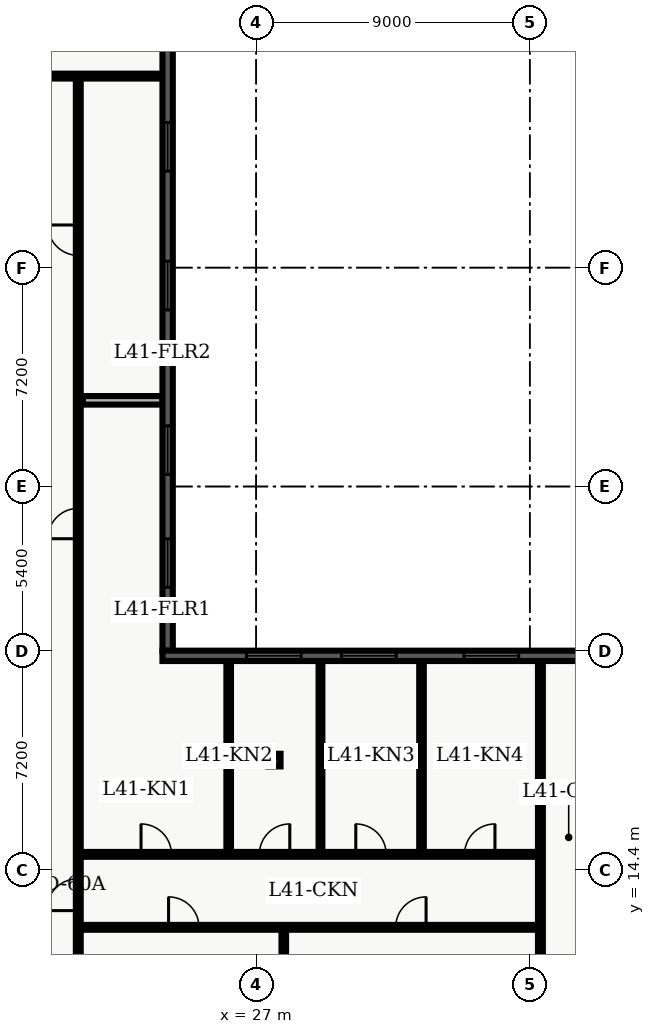
"""IFC4 building model, lengths in metres.
Left out: names, types, materials, properties, quantities, classifications, styles, units other than length and angle.
Written with IfcOpenShell. Run it as: python <this file> out.ifc"""

import sys

from ifc_helpers import new_model, entity, si_unit, converted_unit, direction, frame, origin_with_axes, origin_2d_with_axis, place, context, subcontext, project, spatial, polyline, rectangle, i_section, outline, extrude, element, fill, save


model = new_model("IFC4")
c1 = context("Model", 3, precision=1e-05, world=origin_with_axes(), true_north=direction((0.0, 1.0)))
c2 = subcontext(c1, "Body", "Model", "MODEL_VIEW")
j1 = project(units=[si_unit("LENGTHUNIT", "METRE"), converted_unit("PLANEANGLEUNIT", "DEGREE", entity("IfcPlaneAngleMeasure", 0.017), si_unit("PLANEANGLEUNIT", "RADIAN"), dimensions=[0, 0, 0, 0, 0, 0, 0])], contexts=[c1])
p1 = place(None, origin_with_axes())
s1 = spatial("IfcSite", under=j1, at=p1, CompositionType="ELEMENT")
p2 = place(p1, origin_with_axes())
s2 = spatial("IfcBuilding", under=s1, at=p2, CompositionType="ELEMENT")
p3 = place(p2, frame((0.0, 0.0, 168.0), z_axis=(0.0, 0.0, 1.0), x_axis=(1.0, 0.0, 0.0)))
s3 = spatial("IfcBuildingStorey", under=s2, at=p3, CompositionType="ELEMENT", Elevation=168.0)
p4 = place(p3, frame((27.6, 18.0, 0.0), z_axis=(0.0, 0.0, 1.0), x_axis=(1.0, 0.0, 0.0)))
e1 = element("IfcColumn", 1, at=p4, inside=s3, PredefinedType="COLUMN", context=c2, shape_type="SweptSolid", body=[
    extrude(i_section(OverallWidth=0.406, OverallDepth=0.416, WebThickness=0.03, FlangeThickness=0.048, FilletRadius=0.022, at=origin_2d_with_axis()), origin_with_axes(), (0.0, 0.0, 1.0), 3.9),
])
p5 = place(p3, frame((2.6, 40.5, 0.0), z_axis=(0.0, 0.0, 1.0), x_axis=(1.0, 0.0, 0.0)))
e2 = element("IfcWall", 2, at=p5, inside=s3, PredefinedType="PARTITIONING", context=c2, shape_type="SweptSolid", body=[
    extrude(outline(polyline([(0.0, -0.08), (21.324, -0.08), (21.324, 0.08), (0.0, 0.08), (0.0, -0.08)])), origin_with_axes(), (0.0, 0.0, 1.0), 2.7),
])
p6 = place(p5, frame((4.395, 0.0, 0.0), z_axis=(0.0, 0.0, 1.0), x_axis=(1.0, 0.0, 0.0)))
e3 = element("IfcOpeningElement", 3, at=p6, cuts=e2, PredefinedType="OPENING", context=c2, shape_type="SweptSolid", body=[
    extrude(rectangle(XDim=1.2, YDim=0.18, at=origin_2d_with_axis()), origin_with_axes(), (0.0, 0.0, 1.0), 2.2),
])
p7 = place(p5, frame((13.16, 0.0, 0.0), z_axis=(0.0, 0.0, 1.0), x_axis=(1.0, 0.0, 0.0)))
e4 = element("IfcOpeningElement", 4, at=p7, cuts=e2, PredefinedType="OPENING", context=c2, shape_type="SweptSolid", body=[
    extrude(rectangle(XDim=1.0, YDim=0.18, at=origin_2d_with_axis()), origin_with_axes(), (0.0, 0.0, 1.0), 2.15),
])
p8 = place(p3, frame((21.15, 7.8, 0.0), z_axis=(0.0, 0.0, 1.0), x_axis=(0.0, 1.0, 0.0)))
e5 = element("IfcWall", 5, at=p8, inside=s3, PredefinedType="PARTITIONING", context=c2, shape_type="SweptSolid", body=[
    extrude(outline(polyline([(0.0, -0.08), (32.7, -0.08), (32.7, 0.08), (0.0, 0.08), (0.0, -0.08)])), origin_with_axes(), (0.0, 0.0, 1.0), 2.7),
])
p9 = place(p8, frame((17.983, 0.0, 0.0), z_axis=(0.0, 0.0, 1.0), x_axis=(1.0, 0.0, 0.0)))
e6 = element("IfcOpeningElement", 6, at=p9, cuts=e5, PredefinedType="OPENING", context=c2, shape_type="SweptSolid", body=[
    extrude(rectangle(XDim=1.0, YDim=0.18, at=origin_2d_with_axis()), origin_with_axes(), (0.0, 0.0, 1.0), 2.15),
])
p10 = place(p8, frame((27.302, 0.0, 0.0), z_axis=(0.0, 0.0, 1.0), x_axis=(1.0, 0.0, 0.0)))
e7 = element("IfcOpeningElement", 7, at=p10, cuts=e5, PredefinedType="OPENING", context=c2, shape_type="SweptSolid", body=[
    extrude(rectangle(XDim=1.0, YDim=0.18, at=origin_2d_with_axis()), origin_with_axes(), (0.0, 0.0, 1.0), 2.15),
])
p11 = place(p8, frame((5.775, 0.0, 0.0), z_axis=(0.0, 0.0, 1.0), x_axis=(1.0, 0.0, 0.0)))
e8 = element("IfcOpeningElement", 8, at=p11, cuts=e5, PredefinedType="OPENING", context=c2, shape_type="SweptSolid", body=[
    extrude(rectangle(XDim=1.05, YDim=0.18, at=origin_2d_with_axis()), origin_with_axes(), (0.0, 0.0, 1.0), 2.15),
])
p12 = place(p3, frame((21.3, 29.835, 0.0), z_axis=(0.0, 0.0, 1.0), x_axis=(1.0, 0.0, 0.0)))
e9 = element("IfcWall", 9, at=p12, inside=s3, PredefinedType="PARTITIONING", context=c2, shape_type="SweptSolid", body=[
    extrude(outline(polyline([(0.0, -0.14), (2.624, -0.14), (2.624, 0.14), (0.0, 0.14), (0.0, -0.14)])), origin_with_axes(), (0.0, 0.0, 1.0), 2.7),
])
p13 = place(p3, frame((21.15, 12.5, 0.0), z_axis=(0.0, 0.0, 1.0), x_axis=(1.0, 0.0, 0.0)))
e10 = element("IfcWall", 10, at=p13, inside=s3, PredefinedType="PARTITIONING", context=c2, shape_type="SweptSolid", body=[
    extrude(outline(polyline([(0.0, -0.08), (15.2, -0.08), (15.2, 0.08), (0.0, 0.08), (0.0, -0.08)])), origin_with_axes(), (0.0, 0.0, 1.0), 2.7),
])
p14 = place(p13, frame((3.47, 0.0, 0.0), z_axis=(0.0, 0.0, 1.0), x_axis=(1.0, 0.0, 0.0)))
e11 = element("IfcOpeningElement", 11, at=p14, cuts=e10, PredefinedType="OPENING", context=c2, shape_type="SweptSolid", body=[
    extrude(rectangle(XDim=1.0, YDim=0.18, at=origin_2d_with_axis()), origin_with_axes(), (0.0, 0.0, 1.0), 2.15),
])
p15 = place(p13, frame((10.94, 0.0, 0.0), z_axis=(0.0, 0.0, 1.0), x_axis=(1.0, 0.0, 0.0)))
e12 = element("IfcOpeningElement", 12, at=p15, cuts=e10, PredefinedType="OPENING", context=c2, shape_type="SweptSolid", body=[
    extrude(rectangle(XDim=1.0, YDim=0.18, at=origin_2d_with_axis()), origin_with_axes(), (0.0, 0.0, 1.0), 2.15),
])
p16 = place(p3, frame((21.15, 14.9, 0.0), z_axis=(0.0, 0.0, 1.0), x_axis=(1.0, 0.0, 0.0)))
e13 = element("IfcWall", 13, at=p16, inside=s3, PredefinedType="PARTITIONING", context=c2, shape_type="SweptSolid", body=[
    extrude(outline(polyline([(0.0, -0.08), (15.2, -0.08), (15.2, 0.08), (0.0, 0.08), (0.0, -0.08)])), origin_with_axes(), (0.0, 0.0, 1.0), 2.7),
])
p17 = place(p16, frame((2.563, 0.0, 0.0), z_axis=(0.0, 0.0, 1.0), x_axis=(1.0, 0.0, 0.0)))
e14 = element("IfcOpeningElement", 14, at=p17, cuts=e13, PredefinedType="OPENING", context=c2, shape_type="SweptSolid", body=[
    extrude(rectangle(XDim=1.0, YDim=0.18, at=origin_2d_with_axis()), origin_with_axes(), (0.0, 0.0, 1.0), 2.15),
])
p18 = place(p16, frame((6.457, 0.0, 0.0), z_axis=(0.0, 0.0, 1.0), x_axis=(1.0, 0.0, 0.0)))
e15 = element("IfcOpeningElement", 15, at=p18, cuts=e13, PredefinedType="OPENING", context=c2, shape_type="SweptSolid", body=[
    extrude(rectangle(XDim=1.0, YDim=0.18, at=origin_2d_with_axis()), origin_with_axes(), (0.0, 0.0, 1.0), 2.15),
])
p19 = place(p16, frame((9.627, 0.0, 0.0), z_axis=(0.0, 0.0, 1.0), x_axis=(1.0, 0.0, 0.0)))
e16 = element("IfcOpeningElement", 16, at=p19, cuts=e13, PredefinedType="OPENING", context=c2, shape_type="SweptSolid", body=[
    extrude(rectangle(XDim=1.0, YDim=0.18, at=origin_2d_with_axis()), origin_with_axes(), (0.0, 0.0, 1.0), 2.15),
])
p20 = place(p16, frame((13.204, 0.0, 0.0), z_axis=(0.0, 0.0, 1.0), x_axis=(1.0, 0.0, 0.0)))
e17 = element("IfcOpeningElement", 17, at=p20, cuts=e13, PredefinedType="OPENING", context=c2, shape_type="SweptSolid", body=[
    extrude(rectangle(XDim=1.0, YDim=0.18, at=origin_2d_with_axis()), origin_with_axes(), (0.0, 0.0, 1.0), 2.15),
])
p21 = place(p3, frame((36.35, 4.35, 0.0), z_axis=(0.0, 0.0, 1.0), x_axis=(0.0, 1.0, 0.0)))
e18 = element("IfcWall", 18, at=p21, inside=s3, PredefinedType="PARTITIONING", context=c2, shape_type="SweptSolid", body=[
    extrude(outline(polyline([(0.0, -0.08), (16.95, -0.08), (16.95, 0.08), (0.0, 0.08), (0.0, -0.08)])), origin_with_axes(), (0.0, 0.0, 1.0), 2.7),
])
p22 = place(p3, frame((27.909, 0.335, 0.0), z_axis=(0.0, 0.0, 1.0), x_axis=(0.0, 1.0, 0.0)))
e19 = element("IfcWall", 19, at=p22, inside=s3, PredefinedType="PARTITIONING", context=c2, shape_type="SweptSolid", body=[
    extrude(outline(polyline([(0.0, -0.075), (12.045, -0.075), (12.045, 0.075), (0.0, 0.075), (0.0, -0.075)])), origin_with_axes(), (0.0, 0.0, 1.0), 2.7),
])
p23 = place(p3, frame((26.097, 15.02, 0.0), z_axis=(0.0, 0.0, 1.0), x_axis=(0.0, 1.0, 0.0)))
e20 = element("IfcWall", 20, at=p23, inside=s3, PredefinedType="PARTITIONING", context=c2, shape_type="SweptSolid", body=[
    extrude(outline(polyline([(0.0, -0.075), (6.245, -0.075), (6.245, 0.075), (0.0, 0.075), (0.0, -0.075)])), origin_with_axes(), (0.0, 0.0, 1.0), 2.7),
])
p24 = place(p3, frame((29.116, 15.02, 0.0), z_axis=(0.0, 0.0, 1.0), x_axis=(0.0, 1.0, 0.0)))
e21 = element("IfcWall", 21, at=p24, inside=s3, PredefinedType="PARTITIONING", context=c2, shape_type="SweptSolid", body=[
    extrude(outline(polyline([(0.0, -0.062), (6.245, -0.062), (6.245, 0.062), (0.0, 0.062), (0.0, -0.062)])), origin_with_axes(), (0.0, 0.0, 1.0), 2.7),
])
p25 = place(p3, frame((32.439, 15.02, 0.0), z_axis=(0.0, 0.0, 1.0), x_axis=(0.0, 1.0, 0.0)))
e22 = element("IfcWall", 22, at=p25, inside=s3, PredefinedType="PARTITIONING", context=c2, shape_type="SweptSolid", body=[
    extrude(outline(polyline([(0.0, -0.075), (6.245, -0.075), (6.245, 0.075), (0.0, 0.075), (0.0, -0.075)])), origin_with_axes(), (0.0, 0.0, 1.0), 2.7),
])
p26 = place(p3, frame((24.089, 45.62, 0.0), z_axis=(0.0, 0.0, 1.0), x_axis=(0.0, -1.0, 0.0)))
e23 = element("IfcWall", 23, at=p26, inside=s3, PredefinedType="SOLIDWALL", context=c2, shape_type="SweptSolid", body=[
    extrude(outline(polyline([(0.0, -0.17), (24.02, -0.17), (24.02, 0.17), (0.0, 0.17), (0.0, -0.17)])), origin_with_axes(), (0.0, 0.0, 1.0), 3.66),
])
p27 = place(p26, frame((2.882, 0.0, 0.45), z_axis=(0.0, 0.0, 1.0), x_axis=(1.0, 0.0, 0.0)))
e24 = element("IfcOpeningElement", 24, at=p27, cuts=e23, PredefinedType="OPENING", context=c2, shape_type="SweptSolid", body=[
    extrude(rectangle(XDim=1.6, YDim=0.36, at=origin_2d_with_axis()), origin_with_axes(), (0.0, 0.0, 1.0), 2.2),
])
p28 = place(p26, frame((7.446, 0.0, 0.45), z_axis=(0.0, 0.0, 1.0), x_axis=(1.0, 0.0, 0.0)))
e25 = element("IfcOpeningElement", 25, at=p28, cuts=e23, PredefinedType="OPENING", context=c2, shape_type="SweptSolid", body=[
    extrude(rectangle(XDim=1.6, YDim=0.36, at=origin_2d_with_axis()), origin_with_axes(), (0.0, 0.0, 1.0), 2.2),
])
p29 = place(p26, frame((12.01, 0.0, 0.45), z_axis=(0.0, 0.0, 1.0), x_axis=(1.0, 0.0, 0.0)))
e26 = element("IfcOpeningElement", 26, at=p29, cuts=e23, PredefinedType="OPENING", context=c2, shape_type="SweptSolid", body=[
    extrude(rectangle(XDim=1.6, YDim=0.36, at=origin_2d_with_axis()), origin_with_axes(), (0.0, 0.0, 1.0), 2.2),
])
p30 = place(p26, frame((17.424, 0.0, 0.45), z_axis=(0.0, 0.0, 1.0), x_axis=(1.0, 0.0, 0.0)))
e27 = element("IfcOpeningElement", 27, at=p30, cuts=e23, PredefinedType="OPENING", context=c2, shape_type="SweptSolid", body=[
    extrude(rectangle(XDim=1.6, YDim=0.36, at=origin_2d_with_axis()), origin_with_axes(), (0.0, 0.0, 1.0), 2.2),
])
p31 = place(p26, frame((21.138, 0.0, 0.45), z_axis=(0.0, 0.0, 1.0), x_axis=(1.0, 0.0, 0.0)))
e28 = element("IfcOpeningElement", 28, at=p31, cuts=e23, PredefinedType="OPENING", context=c2, shape_type="SweptSolid", body=[
    extrude(rectangle(XDim=1.6, YDim=0.36, at=origin_2d_with_axis()), origin_with_axes(), (0.0, 0.0, 1.0), 2.2),
])
p32 = place(p3, frame((23.919, 21.43, 0.0), z_axis=(0.0, 0.0, 1.0), x_axis=(1.0, 0.0, 0.0)))
e29 = element("IfcWall", 29, at=p32, inside=s3, PredefinedType="SOLIDWALL", context=c2, shape_type="SweptSolid", body=[
    extrude(outline(polyline([(0.0, -0.17), (14.481, -0.17), (14.481, 0.17), (0.0, 0.17), (0.0, -0.17)])), origin_with_axes(), (0.0, 0.0, 1.0), 3.66),
])
p33 = place(p32, frame((3.663, 0.0, 0.45), z_axis=(0.0, 0.0, 1.0), x_axis=(1.0, 0.0, 0.0)))
e30 = element("IfcOpeningElement", 30, at=p33, cuts=e29, PredefinedType="OPENING", context=c2, shape_type="SweptSolid", body=[
    extrude(rectangle(XDim=1.8, YDim=0.36, at=origin_2d_with_axis()), origin_with_axes(), (0.0, 0.0, 1.0), 2.1),
])
p34 = place(p32, frame((6.79, 0.0, 0.45), z_axis=(0.0, 0.0, 1.0), x_axis=(1.0, 0.0, 0.0)))
e31 = element("IfcOpeningElement", 31, at=p34, cuts=e29, PredefinedType="OPENING", context=c2, shape_type="SweptSolid", body=[
    extrude(rectangle(XDim=1.8, YDim=0.36, at=origin_2d_with_axis()), origin_with_axes(), (0.0, 0.0, 1.0), 2.1),
])
p35 = place(p32, frame((10.817, 0.0, 0.45), z_axis=(0.0, 0.0, 1.0), x_axis=(1.0, 0.0, 0.0)))
e32 = element("IfcOpeningElement", 32, at=p35, cuts=e29, PredefinedType="OPENING", context=c2, shape_type="SweptSolid", body=[
    extrude(rectangle(XDim=1.8, YDim=0.36, at=origin_2d_with_axis()), origin_with_axes(), (0.0, 0.0, 1.0), 2.1),
])
p36 = place(p8, frame((17.983, 0.0, 0.0), z_axis=(0.0, 0.0, 1.0), x_axis=(1.0, 0.0, 0.0)))
e33 = element("IfcDoor", 33, at=p36, inside=s3, OperationType="SINGLE_SWING_LEFT", PredefinedType="DOOR", context=c2, shape_type="SweptSolid", body=[
    extrude(rectangle(XDim=1.0, YDim=0.09, at=origin_2d_with_axis()), origin_with_axes(), (0.0, 0.0, 1.0), 2.15),
])
fill(e6, e33)
p37 = place(p8, frame((27.302, 0.0, 0.0), z_axis=(0.0, 0.0, 1.0), x_axis=(1.0, 0.0, 0.0)))
e34 = element("IfcDoor", 34, at=p37, inside=s3, OperationType="SINGLE_SWING_RIGHT", PredefinedType="DOOR", context=c2, shape_type="SweptSolid", body=[
    extrude(rectangle(XDim=1.0, YDim=0.09, at=origin_2d_with_axis()), origin_with_axes(), (0.0, 0.0, 1.0), 2.15),
])
fill(e7, e34)
p38 = place(p8, frame((5.775, 0.0, 0.0), z_axis=(0.0, 0.0, 1.0), x_axis=(1.0, 0.0, 0.0)))
e35 = element("IfcDoor", 35, at=p38, inside=s3, OperationType="SINGLE_SWING_LEFT", PredefinedType="DOOR", context=c2, shape_type="SweptSolid", body=[
    extrude(rectangle(XDim=1.05, YDim=0.09, at=origin_2d_with_axis()), origin_with_axes(), (0.0, 0.0, 1.0), 2.15),
])
fill(e8, e35)
p39 = place(p13, frame((3.47, 0.0, 0.0), z_axis=(0.0, 0.0, 1.0), x_axis=(1.0, 0.0, 0.0)))
e36 = element("IfcDoor", 36, at=p39, inside=s3, OperationType="SINGLE_SWING_LEFT", PredefinedType="DOOR", context=c2, shape_type="SweptSolid", body=[
    extrude(rectangle(XDim=1.0, YDim=0.09, at=origin_2d_with_axis()), origin_with_axes(), (0.0, 0.0, 1.0), 2.15),
])
fill(e11, e36)
p40 = place(p13, frame((10.94, 0.0, 0.0), z_axis=(0.0, 0.0, 1.0), x_axis=(1.0, 0.0, 0.0)))
e37 = element("IfcDoor", 37, at=p40, inside=s3, OperationType="SINGLE_SWING_RIGHT", PredefinedType="DOOR", context=c2, shape_type="SweptSolid", body=[
    extrude(rectangle(XDim=1.0, YDim=0.09, at=origin_2d_with_axis()), origin_with_axes(), (0.0, 0.0, 1.0), 2.15),
])
fill(e12, e37)
p41 = place(p16, frame((2.563, 0.0, 0.0), z_axis=(0.0, 0.0, 1.0), x_axis=(1.0, 0.0, 0.0)))
e38 = element("IfcDoor", 38, at=p41, inside=s3, OperationType="SINGLE_SWING_LEFT", PredefinedType="DOOR", context=c2, shape_type="SweptSolid", body=[
    extrude(rectangle(XDim=1.0, YDim=0.09, at=origin_2d_with_axis()), origin_with_axes(), (0.0, 0.0, 1.0), 2.15),
])
fill(e14, e38)
p42 = place(p16, frame((6.457, 0.0, 0.0), z_axis=(0.0, 0.0, 1.0), x_axis=(1.0, 0.0, 0.0)))
e39 = element("IfcDoor", 39, at=p42, inside=s3, OperationType="SINGLE_SWING_RIGHT", PredefinedType="DOOR", context=c2, shape_type="SweptSolid", body=[
    extrude(rectangle(XDim=1.0, YDim=0.09, at=origin_2d_with_axis()), origin_with_axes(), (0.0, 0.0, 1.0), 2.15),
])
fill(e15, e39)
p43 = place(p16, frame((9.627, 0.0, 0.0), z_axis=(0.0, 0.0, 1.0), x_axis=(1.0, 0.0, 0.0)))
e40 = element("IfcDoor", 40, at=p43, inside=s3, OperationType="SINGLE_SWING_LEFT", PredefinedType="DOOR", context=c2, shape_type="SweptSolid", body=[
    extrude(rectangle(XDim=1.0, YDim=0.09, at=origin_2d_with_axis()), origin_with_axes(), (0.0, 0.0, 1.0), 2.15),
])
fill(e16, e40)
p44 = place(p16, frame((13.204, 0.0, 0.0), z_axis=(0.0, 0.0, 1.0), x_axis=(1.0, 0.0, 0.0)))
e41 = element("IfcDoor", 41, at=p44, inside=s3, OperationType="SINGLE_SWING_RIGHT", PredefinedType="DOOR", context=c2, shape_type="SweptSolid", body=[
    extrude(rectangle(XDim=1.0, YDim=0.09, at=origin_2d_with_axis()), origin_with_axes(), (0.0, 0.0, 1.0), 2.15),
])
fill(e17, e41)
p45 = place(p26, frame((7.446, 0.0, 0.45), z_axis=(0.0, 0.0, 1.0), x_axis=(1.0, 0.0, 0.0)))
e42 = element("IfcWindow", 42, at=p45, inside=s3, PredefinedType="WINDOW", context=c2, shape_type="SweptSolid", body=[
    extrude(rectangle(XDim=1.6, YDim=0.09, at=origin_2d_with_axis()), origin_with_axes(), (0.0, 0.0, 1.0), 2.2),
])
fill(e25, e42)
p46 = place(p26, frame((12.01, 0.0, 0.45), z_axis=(0.0, 0.0, 1.0), x_axis=(1.0, 0.0, 0.0)))
e43 = element("IfcWindow", 43, at=p46, inside=s3, PredefinedType="WINDOW", context=c2, shape_type="SweptSolid", body=[
    extrude(rectangle(XDim=1.6, YDim=0.09, at=origin_2d_with_axis()), origin_with_axes(), (0.0, 0.0, 1.0), 2.2),
])
fill(e26, e43)
p47 = place(p26, frame((17.424, 0.0, 0.45), z_axis=(0.0, 0.0, 1.0), x_axis=(1.0, 0.0, 0.0)))
e44 = element("IfcWindow", 44, at=p47, inside=s3, PredefinedType="WINDOW", context=c2, shape_type="SweptSolid", body=[
    extrude(rectangle(XDim=1.6, YDim=0.09, at=origin_2d_with_axis()), origin_with_axes(), (0.0, 0.0, 1.0), 2.2),
])
fill(e27, e44)
p48 = place(p26, frame((21.138, 0.0, 0.45), z_axis=(0.0, 0.0, 1.0), x_axis=(1.0, 0.0, 0.0)))
e45 = element("IfcWindow", 45, at=p48, inside=s3, PredefinedType="WINDOW", context=c2, shape_type="SweptSolid", body=[
    extrude(rectangle(XDim=1.6, YDim=0.09, at=origin_2d_with_axis()), origin_with_axes(), (0.0, 0.0, 1.0), 2.2),
])
fill(e28, e45)
p49 = place(p32, frame((3.663, 0.0, 0.45), z_axis=(0.0, 0.0, 1.0), x_axis=(1.0, 0.0, 0.0)))
e46 = element("IfcWindow", 46, at=p49, inside=s3, PredefinedType="WINDOW", context=c2, shape_type="SweptSolid", body=[
    extrude(rectangle(XDim=1.8, YDim=0.09, at=origin_2d_with_axis()), origin_with_axes(), (0.0, 0.0, 1.0), 2.1),
])
fill(e30, e46)
p50 = place(p32, frame((6.79, 0.0, 0.45), z_axis=(0.0, 0.0, 1.0), x_axis=(1.0, 0.0, 0.0)))
e47 = element("IfcWindow", 47, at=p50, inside=s3, PredefinedType="WINDOW", context=c2, shape_type="SweptSolid", body=[
    extrude(rectangle(XDim=1.8, YDim=0.09, at=origin_2d_with_axis()), origin_with_axes(), (0.0, 0.0, 1.0), 2.1),
])
fill(e31, e47)
p51 = place(p32, frame((10.817, 0.0, 0.45), z_axis=(0.0, 0.0, 1.0), x_axis=(1.0, 0.0, 0.0)))
e48 = element("IfcWindow", 48, at=p51, inside=s3, PredefinedType="WINDOW", context=c2, shape_type="SweptSolid", body=[
    extrude(rectangle(XDim=1.8, YDim=0.09, at=origin_2d_with_axis()), origin_with_axes(), (0.0, 0.0, 1.0), 2.1),
])
fill(e32, e48)
save(model, sys.argv[1])
